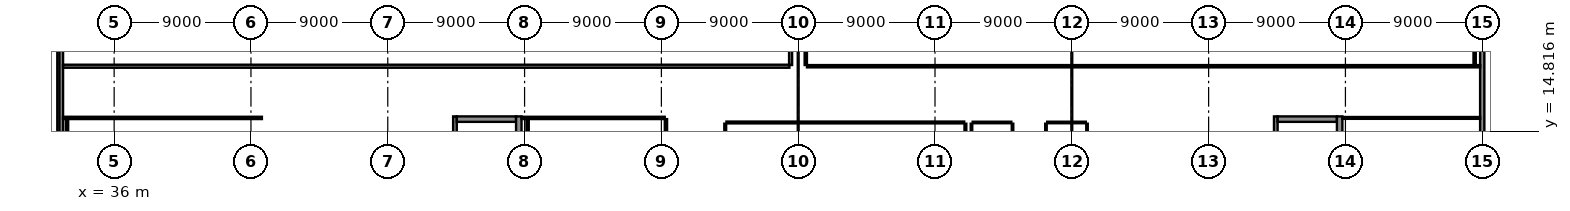
"""IFC4 building model, lengths in metres.
Left out: names, types, materials, properties, quantities, classifications, styles, units other than length and angle.
Written with IfcOpenShell. Run it as: python <this file> out.ifc"""

import sys

from ifc_helpers import new_model, si_unit, direction, frame, frame_2d, origin, place, context, subcontext, project, spatial, rectangle, extrude, element, fill, save


model = new_model("IFC4")
c1 = context("Model", 3, precision=1e-05, world=origin(), true_north=direction((0.0, 1.0)))
c2 = subcontext(c1, "Body", "Model", "MODEL_VIEW")
j1 = project(units=[si_unit("LENGTHUNIT", "METRE"), si_unit("PLANEANGLEUNIT", "RADIAN")], contexts=[c1])
p1 = place(None, origin())
s1 = spatial("IfcSite", under=j1, at=p1, CompositionType="ELEMENT")
p2 = place(p1, origin())
s2 = spatial("IfcBuilding", under=s1, at=p2, CompositionType="ELEMENT")
p3 = place(p2, frame((0.0, 0.0, 35.4)))
s3 = spatial("IfcBuildingStorey", under=s2, at=p3, CompositionType="ELEMENT", Elevation=35.4)
p4 = place(p3, frame((32.4, 23.96, 0.0), z_axis=(0.0, 0.0, 1.0), x_axis=(0.0, -1.0, 0.0)))
e1 = element("IfcWall", 1, at=p4, inside=s3, PredefinedType="SOLIDWALL", context=c2, shape_type="SweptSolid", body=[
    extrude(rectangle(XDim=11.97, YDim=0.28, at=frame_2d((5.985, 0.0))), origin(), (0.0, 0.0, 1.0), 3.095),
])
p5 = place(p4, frame((2.941, 0.0, 1.05)))
e2 = element("IfcOpeningElement", 2, at=p5, cuts=e1, PredefinedType="OPENING", context=c2, shape_type="SweptSolid", body=[
    extrude(rectangle(XDim=1.3, YDim=1.3, at=frame_2d((0.65, 0.65))), frame((0.0, 0.155, 0.0), z_axis=(0.0, -1.0, 0.0), x_axis=(1.0, 0.0, 0.0)), (0.0, 0.0, 1.0), 0.31),
])
p6 = place(p4, frame((8.5, 0.0, 1.05)))
e3 = element("IfcOpeningElement", 3, at=p6, cuts=e1, PredefinedType="OPENING", context=c2, shape_type="SweptSolid", body=[
    extrude(rectangle(XDim=1.3, YDim=1.3, at=frame_2d((0.65, 0.65))), frame((0.0, 0.155, 0.0), z_axis=(0.0, -1.0, 0.0), x_axis=(1.0, 0.0, 0.0)), (0.0, 0.0, 1.0), 0.31),
])
p7 = place(p3, frame((126.0, 12.128, 0.0), z_axis=(0.0, 0.0, 1.0), x_axis=(0.0, 1.0, 0.0)))
e4 = element("IfcWall", 4, at=p7, inside=s3, PredefinedType="SOLIDWALL", context=c2, shape_type="SweptSolid", body=[
    extrude(rectangle(XDim=11.649, YDim=0.28, at=frame_2d((5.825, 0.0))), origin(), (0.0, 0.0, 1.0), 3.195),
])
p8 = place(p7, frame((2.032, 0.0, 1.05)))
e5 = element("IfcOpeningElement", 5, at=p8, cuts=e4, PredefinedType="OPENING", context=c2, shape_type="SweptSolid", body=[
    extrude(rectangle(XDim=1.3, YDim=1.3, at=frame_2d((0.65, 0.65))), frame((0.0, 0.155, 0.0), z_axis=(0.0, -1.0, 0.0), x_axis=(1.0, 0.0, 0.0)), (0.0, 0.0, 1.0), 0.31),
])
p9 = place(p7, frame((7.504, 0.0, 1.05)))
e6 = element("IfcOpeningElement", 6, at=p9, cuts=e4, PredefinedType="OPENING", context=c2, shape_type="SweptSolid", body=[
    extrude(rectangle(XDim=1.3, YDim=1.3, at=frame_2d((0.65, 0.65))), frame((0.0, 0.155, 0.0), z_axis=(0.0, -1.0, 0.0), x_axis=(1.0, 0.0, 0.0)), (0.0, 0.0, 1.0), 0.31),
])
p10 = place(p3, frame((32.52, 23.58, 3.8), z_axis=(0.0, 0.0, 1.0), x_axis=(0.0, -1.0, 0.0)))
e7 = element("IfcWall", 7, at=p10, inside=s3, PredefinedType="PARAPET", context=c2, shape_type="SweptSolid", body=[
    extrude(rectangle(XDim=11.52, YDim=0.24, at=frame_2d((5.76, 0.0))), origin(), (0.0, 0.0, 1.0), 1.1),
])
p11 = place(p3, frame((58.42, 13.04, 0.0), z_axis=(0.0, 0.0, 1.0), x_axis=(0.0, 1.0, 0.0)))
e8 = element("IfcWall", 8, at=p11, inside=s3, PredefinedType="SHEAR", context=c2, shape_type="SweptSolid", body=[
    extrude(rectangle(XDim=2.76, YDim=0.24, at=frame_2d((1.38, 0.0))), origin(), (0.0, 0.0, 1.0), 3.66),
])
p12 = place(p3, frame((58.54, 15.62, 0.0), z_axis=(0.0, 0.0, 1.0), x_axis=(1.0, 0.0, 0.0)))
e9 = element("IfcWall", 9, at=p12, inside=s3, PredefinedType="SHEAR", context=c2, shape_type="SweptSolid", body=[
    extrude(rectangle(XDim=3.9, YDim=0.36, at=frame_2d((1.95, 0.0))), origin(), (0.0, 0.0, 1.0), 3.66),
])
p13 = place(p12, frame((1.15, 0.0, 0.0)))
e10 = element("IfcOpeningElement", 10, at=p13, cuts=e9, PredefinedType="OPENING", context=c2, shape_type="SweptSolid", body=[
    extrude(rectangle(XDim=1.6, YDim=2.25, at=frame_2d((0.8, 1.125))), frame((0.0, 0.195, 0.0), z_axis=(0.0, -1.0, 0.0), x_axis=(1.0, 0.0, 0.0)), (0.0, 0.0, 1.0), 0.39),
])
p14 = place(p3, frame((62.62, 6.76, 0.0), z_axis=(0.0, 0.0, 1.0), x_axis=(0.0, 1.0, 0.0)))
e11 = element("IfcWall", 11, at=p14, inside=s3, PredefinedType="SHEAR", context=c2, shape_type="SweptSolid", body=[
    extrude(rectangle(XDim=9.04, YDim=0.36, at=frame_2d((4.52, 0.0))), origin(), (0.0, 0.0, 1.0), 3.66),
])
p15 = place(p3, frame((112.42, 13.04, 0.0), z_axis=(0.0, 0.0, 1.0), x_axis=(0.0, 1.0, 0.0)))
e12 = element("IfcWall", 12, at=p15, inside=s3, PredefinedType="SHEAR", context=c2, shape_type="SweptSolid", body=[
    extrude(rectangle(XDim=2.76, YDim=0.24, at=frame_2d((1.38, 0.0))), origin(), (0.0, 0.0, 1.0), 3.66),
])
p16 = place(p3, frame((112.54, 15.62, 0.0), z_axis=(0.0, 0.0, 1.0), x_axis=(1.0, 0.0, 0.0)))
e13 = element("IfcWall", 13, at=p16, inside=s3, PredefinedType="SHEAR", context=c2, shape_type="SweptSolid", body=[
    extrude(rectangle(XDim=3.9, YDim=0.36, at=frame_2d((1.95, 0.0))), origin(), (0.0, 0.0, 1.0), 3.66),
])
p17 = place(p16, frame((1.15, 0.0, 0.0)))
e14 = element("IfcOpeningElement", 14, at=p17, cuts=e13, PredefinedType="OPENING", context=c2, shape_type="SweptSolid", body=[
    extrude(rectangle(XDim=1.6, YDim=2.25, at=frame_2d((0.8, 1.125))), frame((0.0, 0.195, 0.0), z_axis=(0.0, -1.0, 0.0), x_axis=(1.0, 0.0, 0.0)), (0.0, 0.0, 1.0), 0.39),
])
p18 = place(p3, frame((116.62, 6.76, 0.0), z_axis=(0.0, 0.0, 1.0), x_axis=(0.0, 1.0, 0.0)))
e15 = element("IfcWall", 15, at=p18, inside=s3, PredefinedType="SHEAR", context=c2, shape_type="SweptSolid", body=[
    extrude(rectangle(XDim=9.04, YDim=0.36, at=frame_2d((4.52, 0.0))), origin(), (0.0, 0.0, 1.0), 3.66),
])
p19 = place(p3, frame((32.9, 0.47, 0.0), z_axis=(0.0, 0.0, 1.0), x_axis=(0.0, 1.0, 0.0)))
e16 = element("IfcWall", 16, at=p19, inside=s3, PredefinedType="PARTITIONING", context=c2, shape_type="SweptSolid", body=[
    extrude(rectangle(XDim=15.15, YDim=0.15, at=frame_2d((7.575, 0.0))), origin(), (0.0, 0.0, 1.0), 3.64),
])
p20 = place(p3, frame((32.635, 15.7, 0.0), z_axis=(0.0, 0.0, 1.0), x_axis=(1.0, 0.0, 0.0)))
e17 = element("IfcWall", 17, at=p20, inside=s3, PredefinedType="PARTITIONING", context=c2, shape_type="SweptSolid", body=[
    extrude(rectangle(XDim=13.085, YDim=0.15, at=frame_2d((6.542, 0.0))), origin(), (0.0, 0.0, 1.0), 3.64),
])
p21 = place(p20, frame((6.017, 0.0, 0.0)))
e18 = element("IfcOpeningElement", 18, at=p21, cuts=e17, PredefinedType="OPENING", context=c2, shape_type="SweptSolid", body=[
    extrude(rectangle(XDim=1.05, YDim=2.25, at=frame_2d((0.525, 1.125))), frame((0.0, 0.09, 0.0), z_axis=(0.0, -1.0, 0.0), x_axis=(1.0, 0.0, 0.0)), (0.0, 0.0, 1.0), 0.18),
])
p22 = place(p3, frame((80.5, 23.865, 0.0), z_axis=(0.0, 0.0, 1.0), x_axis=(0.0, -1.0, 0.0)))
e19 = element("IfcWall", 19, at=p22, inside=s3, PredefinedType="PARTITIONING", context=c2, shape_type="SweptSolid", body=[
    extrude(rectangle(XDim=4.685, YDim=0.2, at=frame_2d((2.343, 0.0))), origin(), (0.0, 0.0, 1.0), 3.315),
])
p23 = place(p3, frame((80.42, 19.1, 0.0), z_axis=(0.0, 0.0, 1.0), x_axis=(-1.0, 0.0, 0.0)))
e20 = element("IfcWall", 20, at=p23, inside=s3, PredefinedType="PARTITIONING", context=c2, shape_type="SweptSolid", body=[
    extrude(rectangle(XDim=47.785, YDim=0.2, at=frame_2d((23.893, 0.0))), origin(), (0.0, 0.0, 1.0), 3.64),
])
p24 = place(p23, frame((23.042, 0.0, 0.0)))
e21 = element("IfcOpeningElement", 21, at=p24, cuts=e20, PredefinedType="OPENING", context=c2, shape_type="SweptSolid", body=[
    extrude(rectangle(XDim=1.7, YDim=2.4, at=frame_2d((0.85, 1.2))), frame((0.0, 0.115, 0.0), z_axis=(0.0, -1.0, 0.0), x_axis=(1.0, 0.0, 0.0)), (0.0, 0.0, 1.0), 0.23),
])
p25 = place(p3, frame((125.5, 23.53, 0.0), z_axis=(0.0, 0.0, 1.0), x_axis=(0.0, -1.0, 0.0)))
e22 = element("IfcWall", 22, at=p25, inside=s3, PredefinedType="PARTITIONING", context=c2, shape_type="SweptSolid", body=[
    extrude(rectangle(XDim=4.35, YDim=0.15, at=frame_2d((2.175, 0.0))), origin(), (0.0, 0.0, 1.0), 3.64),
])
p26 = place(p3, frame((125.865, 19.1, 0.0), z_axis=(0.0, 0.0, 1.0), x_axis=(-1.0, 0.0, 0.0)))
e23 = element("IfcWall", 23, at=p26, inside=s3, PredefinedType="PARTITIONING", context=c2, shape_type="SweptSolid", body=[
    extrude(rectangle(XDim=44.285, YDim=0.15, at=frame_2d((22.143, 0.0))), origin(), (0.0, 0.0, 1.0), 3.64),
])
p27 = place(p26, frame((21.617, 0.0, 0.0)))
e24 = element("IfcOpeningElement", 24, at=p27, cuts=e23, PredefinedType="OPENING", context=c2, shape_type="SweptSolid", body=[
    extrude(rectangle(XDim=1.05, YDim=2.25, at=frame_2d((0.525, 1.125))), frame((0.0, 0.09, 0.0), z_axis=(0.0, -1.0, 0.0), x_axis=(1.0, 0.0, 0.0)), (0.0, 0.0, 1.0), 0.18),
])
p28 = place(p3, frame((81.5, 19.18, 0.0), z_axis=(0.0, 0.0, 1.0), x_axis=(0.0, 1.0, 0.0)))
e25 = element("IfcWall", 25, at=p28, inside=s3, PredefinedType="PARTITIONING", context=c2, shape_type="SweptSolid", body=[
    extrude(rectangle(XDim=4.585, YDim=0.15, at=frame_2d((2.292, 0.0))), origin(), (0.0, 0.0, 1.0), 3.315),
])
p29 = place(p3, frame((72.3, 15.62, 0.0), z_axis=(0.0, 0.0, 1.0), x_axis=(0.0, -1.0, 0.0)))
e26 = element("IfcWall", 26, at=p29, inside=s3, PredefinedType="PARTITIONING", context=c2, shape_type="SweptSolid", body=[
    extrude(rectangle(XDim=3.04, YDim=0.15, at=frame_2d((1.52, 0.0))), origin(), (0.0, 0.0, 1.0), 3.64),
])
p30 = place(p3, frame((63.2, 12.57, 0.0), z_axis=(0.0, 0.0, 1.0), x_axis=(0.0, 1.0, 0.0)))
e27 = element("IfcWall", 27, at=p30, inside=s3, PredefinedType="PARTITIONING", context=c2, shape_type="SweptSolid", body=[
    extrude(rectangle(XDim=3.05, YDim=0.15, at=frame_2d((1.525, 0.0))), origin(), (0.0, 0.0, 1.0), 3.245),
])
p31 = place(p3, frame((62.795, 15.7, 0.0), z_axis=(0.0, 0.0, 1.0), x_axis=(1.0, 0.0, 0.0)))
e28 = element("IfcWall", 28, at=p31, inside=s3, PredefinedType="PARTITIONING", context=c2, shape_type="SweptSolid", body=[
    extrude(rectangle(XDim=9.425, YDim=0.15, at=frame_2d((4.712, 0.0))), origin(), (0.0, 0.0, 1.0), 3.64),
])
p32 = place(p31, frame((4.187, 0.0, 0.0)))
e29 = element("IfcOpeningElement", 29, at=p32, cuts=e28, PredefinedType="OPENING", context=c2, shape_type="SweptSolid", body=[
    extrude(rectangle(XDim=1.05, YDim=2.25, at=frame_2d((0.525, 1.125))), frame((0.0, 0.09, 0.0), z_axis=(0.0, -1.0, 0.0), x_axis=(1.0, 0.0, 0.0)), (0.0, 0.0, 1.0), 0.18),
])
p33 = place(p3, frame((76.2, 3.67, 0.0), z_axis=(0.0, 0.0, 1.0), x_axis=(0.0, 1.0, 0.0)))
e30 = element("IfcWall", 30, at=p33, inside=s3, PredefinedType="PARTITIONING", context=c2, shape_type="SweptSolid", body=[
    extrude(rectangle(XDim=11.65, YDim=0.12, at=frame_2d((5.825, 0.0))), origin(), (0.0, 0.0, 1.0), 3.64),
])
p34 = place(p3, frame((76.28, 15.4, 0.0), z_axis=(0.0, 0.0, 1.0), x_axis=(1.0, 0.0, 0.0)))
e31 = element("IfcWall", 31, at=p34, inside=s3, PredefinedType="PARTITIONING", context=c2, shape_type="SweptSolid", body=[
    extrude(rectangle(XDim=15.64, YDim=0.12, at=frame_2d((7.82, 0.0))), origin(), (0.0, 0.0, 1.0), 3.64),
])
p35 = place(p34, frame((7.37, 0.0, 0.0)))
e32 = element("IfcOpeningElement", 32, at=p35, cuts=e31, PredefinedType="OPENING", context=c2, shape_type="SweptSolid", body=[
    extrude(rectangle(XDim=0.9, YDim=2.1, at=frame_2d((0.45, 1.05))), frame((0.0, 0.075, 0.0), z_axis=(0.0, -1.0, 0.0), x_axis=(1.0, 0.0, 0.0)), (0.0, 0.0, 1.0), 0.15),
])
p36 = place(p3, frame((92.0, 15.32, 0.0), z_axis=(0.0, 0.0, 1.0), x_axis=(0.0, -1.0, 0.0)))
e33 = element("IfcWall", 33, at=p36, inside=s3, PredefinedType="PARTITIONING", context=c2, shape_type="SweptSolid", body=[
    extrude(rectangle(XDim=11.65, YDim=0.12, at=frame_2d((5.825, 0.0))), origin(), (0.0, 0.0, 1.0), 3.64),
])
p37 = place(p3, frame((116.795, 15.7, 0.0), z_axis=(0.0, 0.0, 1.0), x_axis=(1.0, 0.0, 0.0)))
e34 = element("IfcWall", 34, at=p37, inside=s3, PredefinedType="PARTITIONING", context=c2, shape_type="SweptSolid", body=[
    extrude(rectangle(XDim=9.07, YDim=0.12, at=frame_2d((4.535, 0.0))), origin(), (0.0, 0.0, 1.0), 3.64),
])
p38 = place(p37, frame((4.06, 0.0, 0.0)))
e35 = element("IfcOpeningElement", 35, at=p38, cuts=e34, PredefinedType="OPENING", context=c2, shape_type="SweptSolid", body=[
    extrude(rectangle(XDim=0.95, YDim=2.15, at=frame_2d((0.475, 1.075))), frame((0.0, 0.075, 0.0), z_axis=(0.0, -1.0, 0.0), x_axis=(1.0, 0.0, 0.0)), (0.0, 0.0, 1.0), 0.15),
])
p39 = place(p3, frame((92.48, 15.4, 0.0), z_axis=(0.0, 0.0, 1.0), x_axis=(1.0, 0.0, 0.0)))
e36 = element("IfcWall", 36, at=p39, inside=s3, PredefinedType="PARTITIONING", context=c2, shape_type="SweptSolid", body=[
    extrude(rectangle(XDim=2.54, YDim=0.1, at=frame_2d((1.27, 0.0))), origin(), (0.0, 0.0, 1.0), 3.64),
])
p40 = place(p3, frame((95.1, 15.32, 0.0), z_axis=(0.0, 0.0, 1.0), x_axis=(0.0, -1.0, 0.0)))
e37 = element("IfcWall", 37, at=p40, inside=s3, PredefinedType="PARTITIONING", context=c2, shape_type="SweptSolid", body=[
    extrude(rectangle(XDim=5.34, YDim=0.1, at=frame_2d((2.67, 0.0))), origin(), (0.0, 0.0, 1.0), 3.64),
])
p41 = place(p40, frame((2.22, 0.0, 0.0)))
e38 = element("IfcOpeningElement", 38, at=p41, cuts=e37, PredefinedType="OPENING", context=c2, shape_type="SweptSolid", body=[
    extrude(rectangle(XDim=0.9, YDim=2.05, at=frame_2d((0.45, 1.025))), frame((0.0, 0.065, 0.0), z_axis=(0.0, -1.0, 0.0), x_axis=(1.0, 0.0, 0.0)), (0.0, 0.0, 1.0), 0.13),
])
p42 = place(p3, frame((92.4, 9.845, 0.0), z_axis=(0.0, 0.0, 1.0), x_axis=(0.0, 1.0, 0.0)))
e39 = element("IfcWall", 39, at=p42, inside=s3, PredefinedType="PARTITIONING", context=c2, shape_type="SweptSolid", body=[
    extrude(rectangle(XDim=5.475, YDim=0.1, at=frame_2d((2.738, 0.0))), origin(), (0.0, 0.0, 1.0), 3.64),
])
p43 = place(p3, frame((97.38, 15.4, 0.0), z_axis=(0.0, 0.0, 1.0), x_axis=(1.0, 0.0, 0.0)))
e40 = element("IfcWall", 40, at=p43, inside=s3, PredefinedType="PARTITIONING", context=c2, shape_type="SweptSolid", body=[
    extrude(rectangle(XDim=2.54, YDim=0.1, at=frame_2d((1.27, 0.0))), origin(), (0.0, 0.0, 1.0), 3.64),
])
p44 = place(p3, frame((100.0, 15.32, 0.0), z_axis=(0.0, 0.0, 1.0), x_axis=(0.0, -1.0, 0.0)))
e41 = element("IfcWall", 41, at=p44, inside=s3, PredefinedType="PARTITIONING", context=c2, shape_type="SweptSolid", body=[
    extrude(rectangle(XDim=5.44, YDim=0.1, at=frame_2d((2.72, 0.0))), origin(), (0.0, 0.0, 1.0), 3.64),
])
p45 = place(p3, frame((97.3, 9.88, 0.0), z_axis=(0.0, 0.0, 1.0), x_axis=(0.0, 1.0, 0.0)))
e42 = element("IfcWall", 42, at=p45, inside=s3, PredefinedType="PARTITIONING", context=c2, shape_type="SweptSolid", body=[
    extrude(rectangle(XDim=5.44, YDim=0.1, at=frame_2d((2.72, 0.0))), origin(), (0.0, 0.0, 1.0), 3.64),
])
p46 = place(p45, frame((2.22, 0.0, 0.0)))
e43 = element("IfcOpeningElement", 43, at=p46, cuts=e42, PredefinedType="OPENING", context=c2, shape_type="SweptSolid", body=[
    extrude(rectangle(XDim=1.0, YDim=2.1, at=frame_2d((0.5, 1.05))), frame((0.0, 0.065, 0.0), z_axis=(0.0, -1.0, 0.0), x_axis=(1.0, 0.0, 0.0)), (0.0, 0.0, 1.0), 0.13),
])
p47 = place(p5, origin())
e44 = element("IfcWindow", 44, at=p47, inside=s3, PartitioningType="SINGLE_PANEL", PredefinedType="WINDOW", context=c2, shape_type="SweptSolid", body=[
    extrude(rectangle(XDim=1.3, YDim=1.3, at=frame_2d((0.65, 0.65))), frame((0.0, 0.03, 0.0), z_axis=(0.0, -1.0, 0.0), x_axis=(1.0, 0.0, 0.0)), (0.0, 0.0, 1.0), 0.06),
])
fill(e2, e44)
p48 = place(p6, origin())
e45 = element("IfcWindow", 45, at=p48, inside=s3, PartitioningType="SINGLE_PANEL", PredefinedType="WINDOW", context=c2, shape_type="SweptSolid", body=[
    extrude(rectangle(XDim=1.3, YDim=1.3, at=frame_2d((0.65, 0.65))), frame((0.0, 0.03, 0.0), z_axis=(0.0, -1.0, 0.0), x_axis=(1.0, 0.0, 0.0)), (0.0, 0.0, 1.0), 0.06),
])
fill(e3, e45)
p49 = place(p8, origin())
e46 = element("IfcWindow", 46, at=p49, inside=s3, PartitioningType="SINGLE_PANEL", PredefinedType="WINDOW", context=c2, shape_type="SweptSolid", body=[
    extrude(rectangle(XDim=1.3, YDim=1.3, at=frame_2d((0.65, 0.65))), frame((0.0, 0.03, 0.0), z_axis=(0.0, -1.0, 0.0), x_axis=(1.0, 0.0, 0.0)), (0.0, 0.0, 1.0), 0.06),
])
fill(e5, e46)
p50 = place(p9, origin())
e47 = element("IfcWindow", 47, at=p50, inside=s3, PartitioningType="SINGLE_PANEL", PredefinedType="WINDOW", context=c2, shape_type="SweptSolid", body=[
    extrude(rectangle(XDim=1.3, YDim=1.3, at=frame_2d((0.65, 0.65))), frame((0.0, 0.03, 0.0), z_axis=(0.0, -1.0, 0.0), x_axis=(1.0, 0.0, 0.0)), (0.0, 0.0, 1.0), 0.06),
])
fill(e6, e47)
p51 = place(p13, origin())
e48 = element("IfcDoor", 48, at=p51, inside=s3, OperationType="DOUBLE_DOOR_SINGLE_SWING", PredefinedType="DOOR", context=c2, shape_type="SweptSolid", body=[
    extrude(rectangle(XDim=1.6, YDim=2.25, at=frame_2d((0.8, 1.125))), frame((0.0, 0.025, 0.0), z_axis=(0.0, -1.0, 0.0), x_axis=(1.0, 0.0, 0.0)), (0.0, 0.0, 1.0), 0.05),
])
fill(e10, e48)
p52 = place(p17, origin())
e49 = element("IfcDoor", 49, at=p52, inside=s3, OperationType="DOUBLE_DOOR_SINGLE_SWING", PredefinedType="DOOR", context=c2, shape_type="SweptSolid", body=[
    extrude(rectangle(XDim=1.6, YDim=2.25, at=frame_2d((0.8, 1.125))), frame((0.0, 0.025, 0.0), z_axis=(0.0, -1.0, 0.0), x_axis=(1.0, 0.0, 0.0)), (0.0, 0.0, 1.0), 0.05),
])
fill(e14, e49)
p53 = place(p21, frame((1.05, 0.0, 0.0), z_axis=(0.0, 0.0, 1.0), x_axis=(-1.0, 0.0, 0.0)))
e50 = element("IfcDoor", 50, at=p53, inside=s3, OperationType="SINGLE_SWING_RIGHT", PredefinedType="DOOR", context=c2, shape_type="SweptSolid", body=[
    extrude(rectangle(XDim=1.05, YDim=2.25, at=frame_2d((0.525, 1.125))), frame((0.0, 0.025, 0.0), z_axis=(0.0, -1.0, 0.0), x_axis=(1.0, 0.0, 0.0)), (0.0, 0.0, 1.0), 0.05),
])
fill(e18, e50)
p54 = place(p24, origin())
e51 = element("IfcDoor", 51, at=p54, inside=s3, OperationType="DOUBLE_DOOR_SINGLE_SWING", PredefinedType="DOOR", context=c2, shape_type="SweptSolid", body=[
    extrude(rectangle(XDim=1.7, YDim=2.4, at=frame_2d((0.85, 1.2))), frame((0.0, 0.025, 0.0), z_axis=(0.0, -1.0, 0.0), x_axis=(1.0, 0.0, 0.0)), (0.0, 0.0, 1.0), 0.05),
])
fill(e21, e51)
p55 = place(p27, frame((1.05, 0.0, 0.0), z_axis=(0.0, 0.0, 1.0), x_axis=(-1.0, 0.0, 0.0)))
e52 = element("IfcDoor", 52, at=p55, inside=s3, OperationType="SINGLE_SWING_LEFT", PredefinedType="DOOR", context=c2, shape_type="SweptSolid", body=[
    extrude(rectangle(XDim=1.05, YDim=2.25, at=frame_2d((0.525, 1.125))), frame((0.0, 0.025, 0.0), z_axis=(0.0, -1.0, 0.0), x_axis=(1.0, 0.0, 0.0)), (0.0, 0.0, 1.0), 0.05),
])
fill(e24, e52)
p56 = place(p32, frame((1.05, 0.0, 0.0), z_axis=(0.0, 0.0, 1.0), x_axis=(-1.0, 0.0, 0.0)))
e53 = element("IfcDoor", 53, at=p56, inside=s3, OperationType="SINGLE_SWING_LEFT", PredefinedType="DOOR", context=c2, shape_type="SweptSolid", body=[
    extrude(rectangle(XDim=1.05, YDim=2.25, at=frame_2d((0.525, 1.125))), frame((0.0, 0.025, 0.0), z_axis=(0.0, -1.0, 0.0), x_axis=(1.0, 0.0, 0.0)), (0.0, 0.0, 1.0), 0.05),
])
fill(e29, e53)
p57 = place(p35, origin())
e54 = element("IfcDoor", 54, at=p57, inside=s3, OperationType="SINGLE_SWING_RIGHT", PredefinedType="DOOR", context=c2, shape_type="SweptSolid", body=[
    extrude(rectangle(XDim=0.9, YDim=2.1, at=frame_2d((0.45, 1.05))), frame((0.0, 0.025, 0.0), z_axis=(0.0, -1.0, 0.0), x_axis=(1.0, 0.0, 0.0)), (0.0, 0.0, 1.0), 0.05),
])
fill(e32, e54)
p58 = place(p38, origin())
e55 = element("IfcDoor", 55, at=p58, inside=s3, OperationType="SINGLE_SWING_RIGHT", PredefinedType="DOOR", context=c2, shape_type="SweptSolid", body=[
    extrude(rectangle(XDim=0.95, YDim=2.15, at=frame_2d((0.475, 1.075))), frame((0.0, 0.025, 0.0), z_axis=(0.0, -1.0, 0.0), x_axis=(1.0, 0.0, 0.0)), (0.0, 0.0, 1.0), 0.05),
])
fill(e35, e55)
save(model, sys.argv[1])
